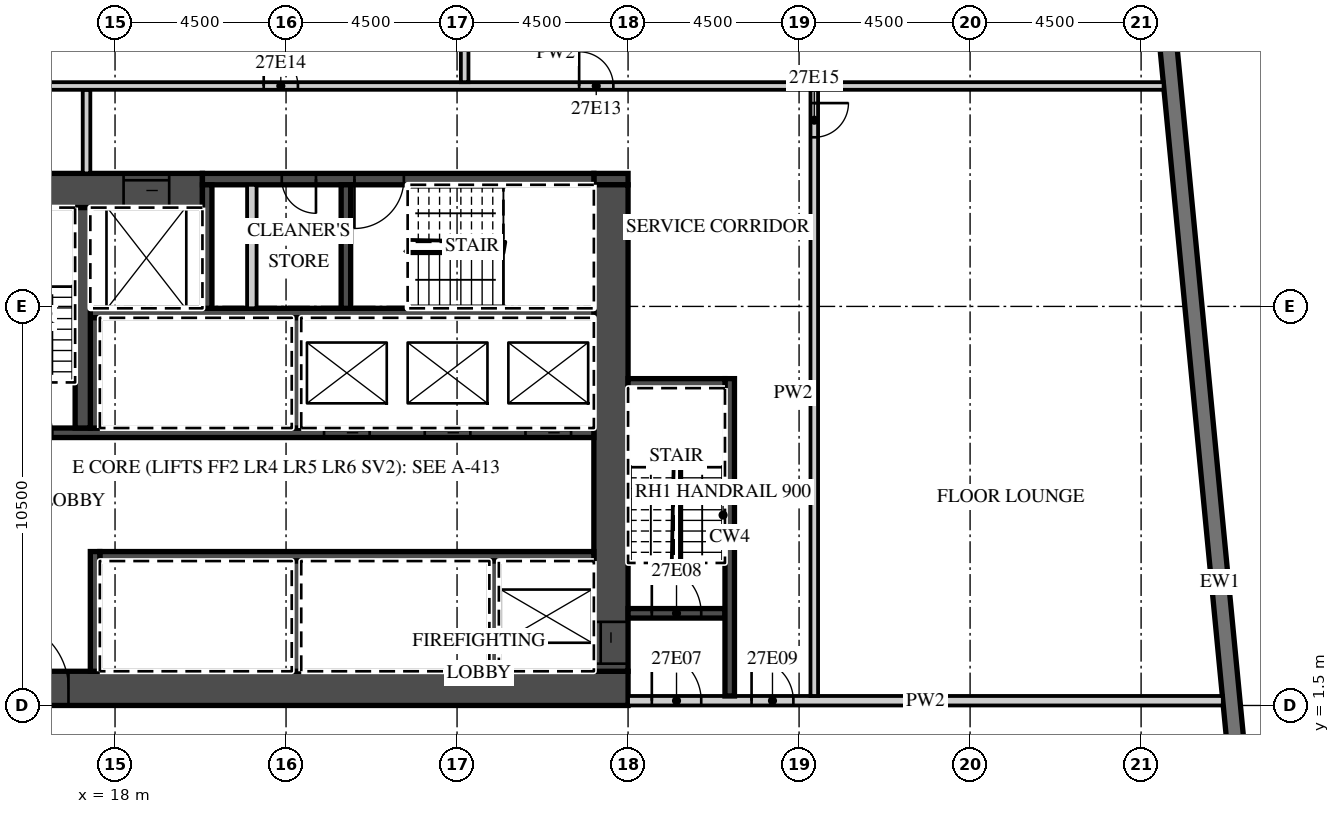
"""IFC4 building model, lengths in metres.
Left out: names, types, materials, properties, quantities, classifications, styles, units other than length and angle.
Written with IfcOpenShell. Run it as: python <this file> out.ifc"""

import sys

from ifc_helpers import new_model, si_unit, direction, frame, frame_2d, origin, place, context, subcontext, project, spatial, rectangle, extrude, element, fill, save


model = new_model("IFC4")
c1 = context("Model", 3, precision=1e-05, world=origin(), true_north=direction((0.0, 1.0)))
c2 = subcontext(c1, "Body", "Model", "MODEL_VIEW")
j1 = project(units=[si_unit("LENGTHUNIT", "METRE"), si_unit("PLANEANGLEUNIT", "RADIAN")], contexts=[c1])
p1 = place(None, origin())
s1 = spatial("IfcSite", under=j1, at=p1, CompositionType="ELEMENT")
p2 = place(p1, origin())
s2 = spatial("IfcBuilding", under=s1, at=p2, CompositionType="ELEMENT")
p3 = place(p2, frame((0.0, 0.0, 124.0)))
s3 = spatial("IfcBuildingStorey", under=s2, at=p3, CompositionType="ELEMENT", Elevation=124.0)
p4 = place(p3, frame((48.753, -12.672, 0.0), z_axis=(0.0, 0.0, 1.0), x_axis=(-0.095842661909, 0.995396495954, 0.0)))
e1 = element("IfcWall", 1, at=p4, inside=s3, PredefinedType="SOLIDWALL", context=c2, shape_type="SweptSolid", body=[
    extrude(rectangle(XDim=35.0, YDim=0.45, at=frame_2d((17.5, 0.0))), origin(), (0.0, 0.0, 1.0), 3.02),
])
p5 = place(p4, frame((3.072, 0.0, 0.45)))
e2 = element("IfcOpeningElement", 2, at=p5, cuts=e1, PredefinedType="OPENING", context=c2, shape_type="SweptSolid", body=[
    extrude(rectangle(XDim=3.3, YDim=2.25, at=frame_2d((1.65, 1.125))), frame((0.0, 0.235, 0.0), z_axis=(0.0, -1.0, 0.0), x_axis=(1.0, 0.0, 0.0)), (0.0, 0.0, 1.0), 0.47),
])
p6 = place(p4, frame((7.593, 0.0, 0.45)))
e3 = element("IfcOpeningElement", 3, at=p6, cuts=e1, PredefinedType="OPENING", context=c2, shape_type="SweptSolid", body=[
    extrude(rectangle(XDim=3.3, YDim=2.25, at=frame_2d((1.65, 1.125))), frame((0.0, 0.235, 0.0), z_axis=(0.0, -1.0, 0.0), x_axis=(1.0, 0.0, 0.0)), (0.0, 0.0, 1.0), 0.47),
])
p7 = place(p3, frame((13.5, 1.95, 0.0), z_axis=(0.0, 0.0, 1.0), x_axis=(1.0, 0.0, 0.0)))
e4 = element("IfcWall", 4, at=p7, inside=s3, PredefinedType="SHEAR", context=c2, shape_type="SweptSolid", body=[
    extrude(rectangle(XDim=18.0, YDim=0.9, at=frame_2d((9.0, 0.0))), origin(), (0.0, 0.0, 1.0), 3.02),
])
p8 = place(p7, frame((1.475, 0.0, 0.0)))
e5 = element("IfcOpeningElement", 5, at=p8, cuts=e4, PredefinedType="OPENING", context=c2, shape_type="SweptSolid", body=[
    extrude(rectangle(XDim=1.8, YDim=2.1, at=frame_2d((0.9, 1.05))), frame((0.0, 0.46, 0.0), z_axis=(0.0, -1.0, 0.0), x_axis=(1.0, 0.0, 0.0)), (0.0, 0.0, 1.0), 0.92),
])
p9 = place(p3, frame((13.5, 15.05, 0.0), z_axis=(0.0, 0.0, 1.0), x_axis=(1.0, 0.0, 0.0)))
e6 = element("IfcWall", 6, at=p9, inside=s3, PredefinedType="SHEAR", context=c2, shape_type="SweptSolid", body=[
    extrude(rectangle(XDim=6.8, YDim=0.9, at=frame_2d((3.4, 0.0))), origin(), (0.0, 0.0, 1.0), 3.02),
])
p10 = place(p9, frame((4.725, 0.0, 0.0)))
e7 = element("IfcOpeningElement", 7, at=p10, cuts=e6, PredefinedType="OPENING", context=c2, shape_type="SweptSolid", body=[
    extrude(rectangle(XDim=1.2, YDim=2.1, at=frame_2d((0.6, 1.05))), frame((0.0, 0.46, 0.0), z_axis=(0.0, -1.0, 0.0), x_axis=(1.0, 0.0, 0.0)), (0.0, 0.0, 1.0), 0.92),
])
p11 = place(p3, frame((30.6, 15.35, 0.0), z_axis=(0.0, 0.0, 1.0), x_axis=(1.0, 0.0, 0.0)))
e8 = element("IfcWall", 8, at=p11, inside=s3, PredefinedType="SHEAR", context=c2, shape_type="SweptSolid", body=[
    extrude(rectangle(XDim=0.9, YDim=0.3, at=frame_2d((0.45, 0.0))), origin(), (0.0, 0.0, 1.0), 3.02),
])
p12 = place(p3, frame((20.3, 15.35, 0.0), z_axis=(0.0, 0.0, 1.0), x_axis=(1.0, 0.0, 0.0)))
e9 = element("IfcWall", 9, at=p12, inside=s3, PredefinedType="SHEAR", context=c2, shape_type="SweptSolid", body=[
    extrude(rectangle(XDim=10.3, YDim=0.3, at=frame_2d((5.15, 0.0))), origin(), (0.0, 0.0, 1.0), 3.02),
])
p13 = place(p12, frame((4.0, 0.0, 0.0)))
e10 = element("IfcOpeningElement", 10, at=p13, cuts=e9, PredefinedType="OPENING", context=c2, shape_type="SweptSolid", body=[
    extrude(rectangle(XDim=1.3, YDim=2.1, at=frame_2d((0.65, 1.05))), frame((0.0, 0.16, 0.0), z_axis=(0.0, -1.0, 0.0), x_axis=(1.0, 0.0, 0.0)), (0.0, 0.0, 1.0), 0.32),
])
p14 = place(p12, frame((2.087, 0.0, 0.0)))
e11 = element("IfcOpeningElement", 11, at=p14, cuts=e9, PredefinedType="OPENING", context=c2, shape_type="SweptSolid", body=[
    extrude(rectangle(XDim=0.9, YDim=2.1, at=frame_2d((0.45, 1.05))), frame((0.0, 0.16, 0.0), z_axis=(0.0, -1.0, 0.0), x_axis=(1.0, 0.0, 0.0)), (0.0, 0.0, 1.0), 0.32),
])
p15 = place(p3, frame((31.05, 2.4, 0.0), z_axis=(0.0, 0.0, 1.0), x_axis=(0.0, 1.0, 0.0)))
e12 = element("IfcWall", 12, at=p15, inside=s3, PredefinedType="SHEAR", context=c2, shape_type="SweptSolid", body=[
    extrude(rectangle(XDim=12.8, YDim=0.9, at=frame_2d((6.4, 0.0))), origin(), (0.0, 0.0, 1.0), 3.02),
])
p16 = place(p15, frame((0.2, 0.0, 0.0)))
e13 = element("IfcOpeningElement", 13, at=p16, cuts=e12, PredefinedType="OPENING", context=c2, shape_type="SweptSolid", body=[
    extrude(rectangle(XDim=1.1, YDim=2.1, at=frame_2d((0.55, 1.05))), frame((0.0, 0.46, 0.0), z_axis=(0.0, -1.0, 0.0), x_axis=(1.0, 0.0, 0.0)), (0.0, 0.0, 1.0), 0.92),
])
p17 = place(p3, frame((17.6, 5.425, 0.0), z_axis=(0.0, 0.0, 1.0), x_axis=(1.0, 0.0, 0.0)))
e14 = element("IfcWall", 14, at=p17, inside=s3, PredefinedType="SHEAR", context=c2, shape_type="SweptSolid", body=[
    extrude(rectangle(XDim=13.0, YDim=0.25, at=frame_2d((6.5, 0.0))), origin(), (0.0, 0.0, 1.0), 3.02),
])
p18 = place(p3, frame((17.475, 2.4, 0.0), z_axis=(0.0, 0.0, 1.0), x_axis=(0.0, 1.0, 0.0)))
e15 = element("IfcWall", 15, at=p18, inside=s3, PredefinedType="SHEAR", context=c2, shape_type="SweptSolid", body=[
    extrude(rectangle(XDim=3.15, YDim=0.25, at=frame_2d((1.575, 0.0))), origin(), (0.0, 0.0, 1.0), 3.02),
])
for number, where, z_axis, x_axis in (
    (16, (27.975, 2.4, 0.0), (0.0, 0.0, 1.0), (0.0, 1.0, 0.0)),
    (17, (22.775, 2.4, 0.0), (0.0, 0.0, 1.0), (0.0, 1.0, 0.0)),
):
    element("IfcWall", number, at=place(p3, frame(where, z_axis=z_axis, x_axis=x_axis)), inside=s3, PredefinedType="SHEAR", context=c2, shape_type="SweptSolid", body=[
        extrude(rectangle(XDim=2.9, YDim=0.25, at=frame_2d((1.45, 0.0))), origin(), (0.0, 0.0, 1.0), 3.02),
    ])
p19 = place(p3, frame((14.4, 8.675, 0.0), z_axis=(0.0, 0.0, 1.0), x_axis=(1.0, 0.0, 0.0)))
e18 = element("IfcWall", 18, at=p19, inside=s3, PredefinedType="SHEAR", context=c2, shape_type="SweptSolid", body=[
    extrude(rectangle(XDim=16.2, YDim=0.25, at=frame_2d((8.1, 0.0))), origin(), (0.0, 0.0, 1.0), 3.02),
])
p20 = place(p19, frame((14.4, 0.0, 0.0)))
e19 = element("IfcOpeningElement", 19, at=p20, cuts=e18, PredefinedType="OPENING", context=c2, shape_type="SweptSolid", body=[
    extrude(rectangle(XDim=1.2, YDim=2.1, at=frame_2d((0.6, 1.05))), frame((0.0, 0.135, 0.0), z_axis=(0.0, -1.0, 0.0), x_axis=(1.0, 0.0, 0.0)), (0.0, 0.0, 1.0), 0.27),
])
p21 = place(p19, frame((11.75, 0.0, 0.0)))
e20 = element("IfcOpeningElement", 20, at=p21, cuts=e18, PredefinedType="OPENING", context=c2, shape_type="SweptSolid", body=[
    extrude(rectangle(XDim=1.2, YDim=2.1, at=frame_2d((0.6, 1.05))), frame((0.0, 0.135, 0.0), z_axis=(0.0, -1.0, 0.0), x_axis=(1.0, 0.0, 0.0)), (0.0, 0.0, 1.0), 0.27),
])
p22 = place(p19, frame((9.1, 0.0, 0.0)))
e21 = element("IfcOpeningElement", 21, at=p22, cuts=e18, PredefinedType="OPENING", context=c2, shape_type="SweptSolid", body=[
    extrude(rectangle(XDim=1.2, YDim=2.1, at=frame_2d((0.6, 1.05))), frame((0.0, 0.135, 0.0), z_axis=(0.0, -1.0, 0.0), x_axis=(1.0, 0.0, 0.0)), (0.0, 0.0, 1.0), 0.27),
])
p23 = place(p19, frame((0.65, 0.0, 0.0)))
e22 = element("IfcOpeningElement", 22, at=p23, cuts=e18, PredefinedType="OPENING", context=c2, shape_type="SweptSolid", body=[
    extrude(rectangle(XDim=1.3, YDim=2.1, at=frame_2d((0.65, 1.05))), frame((0.0, 0.135, 0.0), z_axis=(0.0, -1.0, 0.0), x_axis=(1.0, 0.0, 0.0)), (0.0, 0.0, 1.0), 0.27),
])
p24 = place(p3, frame((17.35, 11.825, 0.0), z_axis=(0.0, 0.0, 1.0), x_axis=(1.0, 0.0, 0.0)))
e23 = element("IfcWall", 23, at=p24, inside=s3, PredefinedType="SHEAR", context=c2, shape_type="SweptSolid", body=[
    extrude(rectangle(XDim=13.25, YDim=0.25, at=frame_2d((6.625, 0.0))), origin(), (0.0, 0.0, 1.0), 3.02),
])
for number, where, z_axis, x_axis in (
    (24, (17.475, 8.8, 0.0), (0.0, 0.0, 1.0), (0.0, 1.0, 0.0)),
    (25, (22.775, 8.8, 0.0), (0.0, 0.0, 1.0), (0.0, 1.0, 0.0)),
):
    element("IfcWall", number, at=place(p3, frame(where, z_axis=z_axis, x_axis=x_axis)), inside=s3, PredefinedType="SHEAR", context=c2, shape_type="SweptSolid", body=[
        extrude(rectangle(XDim=2.9, YDim=0.25, at=frame_2d((1.45, 0.0))), origin(), (0.0, 0.0, 1.0), 3.02),
    ])
p25 = place(p3, frame((17.15, 8.8, 0.0), z_axis=(0.0, 0.0, 1.0), x_axis=(0.0, 1.0, 0.0)))
e26 = element("IfcWall", 26, at=p25, inside=s3, PredefinedType="SHEAR", context=c2, shape_type="SweptSolid", body=[
    extrude(rectangle(XDim=5.8, YDim=0.4, at=frame_2d((2.9, 0.0))), origin(), (0.0, 0.0, 1.0), 3.02),
])
for number, where, z_axis, x_axis in (
    (27, (20.425, 11.95, 0.0), (0.0, 0.0, 1.0), (0.0, 1.0, 0.0)),
    (28, (24.075, 11.95, 0.0), (0.0, 0.0, 1.0), (0.0, 1.0, 0.0)),
):
    element("IfcWall", number, at=place(p3, frame(where, z_axis=z_axis, x_axis=x_axis)), inside=s3, PredefinedType="SHEAR", context=c2, shape_type="SweptSolid", body=[
        extrude(rectangle(XDim=3.25, YDim=0.25, at=frame_2d((1.625, 0.0))), origin(), (0.0, 0.0, 1.0), 3.02),
    ])
p26 = place(p3, frame((21.6, 11.95, 0.0), z_axis=(0.0, 0.0, 1.0), x_axis=(0.0, 1.0, 0.0)))
e29 = element("IfcWall", 29, at=p26, inside=s3, PredefinedType="PARTITIONING", context=c2, shape_type="SweptSolid", body=[
    extrude(rectangle(XDim=3.25, YDim=0.25, at=frame_2d((1.625, 0.0))), origin(), (0.0, 0.0, 1.0), 3.02),
])
p27 = place(p3, frame((31.5, 1.625, 0.0), z_axis=(0.0, 0.0, 1.0), x_axis=(1.0, 0.0, 0.0)))
e30 = element("IfcWall", 30, at=p27, inside=s3, PredefinedType="PARTITIONING", context=c2, shape_type="SweptSolid", body=[
    extrude(rectangle(XDim=15.65, YDim=0.25, at=frame_2d((7.825, 0.0))), origin(), (0.0, 0.0, 1.0), 3.02),
])
p28 = place(p27, frame((0.625, 0.0, 0.0)))
e31 = element("IfcOpeningElement", 31, at=p28, cuts=e30, PredefinedType="OPENING", context=c2, shape_type="SweptSolid", body=[
    extrude(rectangle(XDim=1.3, YDim=2.1, at=frame_2d((0.65, 1.05))), frame((0.0, 0.135, 0.0), z_axis=(0.0, -1.0, 0.0), x_axis=(1.0, 0.0, 0.0)), (0.0, 0.0, 1.0), 0.27),
])
p29 = place(p27, frame((3.25, 0.0, 0.0)))
e32 = element("IfcOpeningElement", 32, at=p29, cuts=e30, PredefinedType="OPENING", context=c2, shape_type="SweptSolid", body=[
    extrude(rectangle(XDim=1.1, YDim=2.1, at=frame_2d((0.55, 1.05))), frame((0.0, 0.135, 0.0), z_axis=(0.0, -1.0, 0.0), x_axis=(1.0, 0.0, 0.0)), (0.0, 0.0, 1.0), 0.27),
])
p30 = place(p3, frame((31.5, 3.925, 0.0), z_axis=(0.0, 0.0, 1.0), x_axis=(1.0, 0.0, 0.0)))
e33 = element("IfcWall", 33, at=p30, inside=s3, PredefinedType="SHEAR", context=c2, shape_type="SweptSolid", body=[
    extrude(rectangle(XDim=2.55, YDim=0.25, at=frame_2d((1.275, 0.0))), origin(), (0.0, 0.0, 1.0), 3.02),
])
p31 = place(p30, frame((0.625, 0.0, 0.0)))
e34 = element("IfcOpeningElement", 34, at=p31, cuts=e33, PredefinedType="OPENING", context=c2, shape_type="SweptSolid", body=[
    extrude(rectangle(XDim=1.3, YDim=2.1, at=frame_2d((0.65, 1.05))), frame((0.0, 0.135, 0.0), z_axis=(0.0, -1.0, 0.0), x_axis=(1.0, 0.0, 0.0)), (0.0, 0.0, 1.0), 0.27),
])
p32 = place(p3, frame((34.175, 1.75, 0.0), z_axis=(0.0, 0.0, 1.0), x_axis=(0.0, 1.0, 0.0)))
e35 = element("IfcWall", 35, at=p32, inside=s3, PredefinedType="SHEAR", context=c2, shape_type="SweptSolid", body=[
    extrude(rectangle(XDim=8.35, YDim=0.25, at=frame_2d((4.175, 0.0))), origin(), (0.0, 0.0, 1.0), 3.02),
])
p33 = place(p3, frame((31.5, 9.975, 0.0), z_axis=(0.0, 0.0, 1.0), x_axis=(1.0, 0.0, 0.0)))
e36 = element("IfcWall", 36, at=p33, inside=s3, PredefinedType="SHEAR", context=c2, shape_type="SweptSolid", body=[
    extrude(rectangle(XDim=2.55, YDim=0.25, at=frame_2d((1.275, 0.0))), origin(), (0.0, 0.0, 1.0), 3.02),
])
p34 = place(p3, frame((17.25, 15.5, 0.0), z_axis=(0.0, 0.0, 1.0), x_axis=(0.0, 1.0, 0.0)))
e37 = element("IfcWall", 37, at=p34, inside=s3, PredefinedType="PARTITIONING", context=c2, shape_type="SweptSolid", body=[
    extrude(rectangle(XDim=2.2, YDim=0.2, at=frame_2d((1.1, 0.0))), origin(), (0.0, 0.0, 1.0), 3.02),
])
p35 = place(p3, frame((36.4, 1.75, 0.0), z_axis=(0.0, 0.0, 1.0), x_axis=(0.0, 1.0, 0.0)))
e38 = element("IfcWall", 38, at=p35, inside=s3, PredefinedType="PARTITIONING", context=c2, shape_type="SweptSolid", body=[
    extrude(rectangle(XDim=15.95, YDim=0.2, at=frame_2d((7.975, 0.0))), origin(), (0.0, 0.0, 1.0), 3.02),
])
p36 = place(p35, frame((14.7, 0.0, 0.0)))
e39 = element("IfcOpeningElement", 39, at=p36, cuts=e38, PredefinedType="OPENING", context=c2, shape_type="SweptSolid", body=[
    extrude(rectangle(XDim=0.9, YDim=2.1, at=frame_2d((0.45, 1.05))), frame((0.0, 0.11, 0.0), z_axis=(0.0, -1.0, 0.0), x_axis=(1.0, 0.0, 0.0)), (0.0, 0.0, 1.0), 0.22),
])
p37 = place(p3, frame((13.6, 17.8, 0.0), z_axis=(0.0, 0.0, 1.0), x_axis=(1.0, 0.0, 0.0)))
e40 = element("IfcWall", 40, at=p37, inside=s3, PredefinedType="PARTITIONING", context=c2, shape_type="SweptSolid", body=[
    extrude(rectangle(XDim=31.993, YDim=0.2, at=frame_2d((15.997, 0.0))), origin(), (0.0, 0.0, 1.0), 3.02),
])
p38 = place(p37, frame((16.613, 0.0, 0.0)))
e41 = element("IfcOpeningElement", 41, at=p38, cuts=e40, PredefinedType="OPENING", context=c2, shape_type="SweptSolid", body=[
    extrude(rectangle(XDim=0.9, YDim=2.1, at=frame_2d((0.45, 1.05))), frame((0.0, 0.11, 0.0), z_axis=(0.0, -1.0, 0.0), x_axis=(1.0, 0.0, 0.0)), (0.0, 0.0, 1.0), 0.22),
])
p39 = place(p37, frame((8.312, 0.0, 0.0)))
e42 = element("IfcOpeningElement", 42, at=p39, cuts=e40, PredefinedType="OPENING", context=c2, shape_type="SweptSolid", body=[
    extrude(rectangle(XDim=0.9, YDim=2.1, at=frame_2d((0.45, 1.05))), frame((0.0, 0.11, 0.0), z_axis=(0.0, -1.0, 0.0), x_axis=(1.0, 0.0, 0.0)), (0.0, 0.0, 1.0), 0.22),
])
p40 = place(p3, frame((27.2, 17.9, 0.0), z_axis=(0.0, 0.0, 1.0), x_axis=(0.0, 1.0, 0.0)))
e43 = element("IfcWall", 43, at=p40, inside=s3, PredefinedType="PARTITIONING", context=c2, shape_type="SweptSolid", body=[
    extrude(rectangle(XDim=6.082, YDim=0.2, at=frame_2d((3.041, 0.0))), origin(), (0.0, 0.0, 1.0), 3.02),
])
p41 = place(p20, origin())
e44 = element("IfcDoor", 44, at=p41, inside=s3, OperationType="SLIDING_TO_LEFT", PredefinedType="DOOR", context=c2, shape_type="SweptSolid", body=[
    extrude(rectangle(XDim=1.2, YDim=2.1, at=frame_2d((0.6, 1.05))), frame((0.0, 0.025, 0.0), z_axis=(0.0, -1.0, 0.0), x_axis=(1.0, 0.0, 0.0)), (0.0, 0.0, 1.0), 0.05),
])
fill(e19, e44)
p42 = place(p21, origin())
e45 = element("IfcDoor", 45, at=p42, inside=s3, OperationType="SLIDING_TO_RIGHT", PredefinedType="DOOR", context=c2, shape_type="SweptSolid", body=[
    extrude(rectangle(XDim=1.2, YDim=2.1, at=frame_2d((0.6, 1.05))), frame((0.0, 0.025, 0.0), z_axis=(0.0, -1.0, 0.0), x_axis=(1.0, 0.0, 0.0)), (0.0, 0.0, 1.0), 0.05),
])
fill(e20, e45)
p43 = place(p22, origin())
e46 = element("IfcDoor", 46, at=p43, inside=s3, OperationType="SLIDING_TO_RIGHT", PredefinedType="DOOR", context=c2, shape_type="SweptSolid", body=[
    extrude(rectangle(XDim=1.2, YDim=2.1, at=frame_2d((0.6, 1.05))), frame((0.0, 0.025, 0.0), z_axis=(0.0, -1.0, 0.0), x_axis=(1.0, 0.0, 0.0)), (0.0, 0.0, 1.0), 0.05),
])
fill(e21, e46)
p44 = place(p10, origin())
e47 = element("IfcDoor", 47, at=p44, inside=s3, OperationType="SLIDING_TO_LEFT", PredefinedType="DOOR", context=c2, shape_type="SweptSolid", body=[
    extrude(rectangle(XDim=1.2, YDim=2.1, at=frame_2d((0.6, 1.05))), frame((0.0, 0.025, 0.0), z_axis=(0.0, -1.0, 0.0), x_axis=(1.0, 0.0, 0.0)), (0.0, 0.0, 1.0), 0.05),
])
fill(e7, e47)
p45 = place(p16, origin())
e48 = element("IfcDoor", 48, at=p45, inside=s3, OperationType="SLIDING_TO_LEFT", PredefinedType="DOOR", context=c2, shape_type="SweptSolid", body=[
    extrude(rectangle(XDim=1.1, YDim=2.1, at=frame_2d((0.55, 1.05))), frame((0.0, 0.025, 0.0), z_axis=(0.0, -1.0, 0.0), x_axis=(1.0, 0.0, 0.0)), (0.0, 0.0, 1.0), 0.05),
])
fill(e13, e48)
p46 = place(p8, origin())
e49 = element("IfcDoor", 49, at=p46, inside=s3, OperationType="DOUBLE_DOOR_DOUBLE_SWING", PredefinedType="DOOR", context=c2, shape_type="SweptSolid", body=[
    extrude(rectangle(XDim=1.8, YDim=2.1, at=frame_2d((0.9, 1.05))), frame((0.0, 0.025, 0.0), z_axis=(0.0, -1.0, 0.0), x_axis=(1.0, 0.0, 0.0)), (0.0, 0.0, 1.0), 0.05),
])
fill(e5, e49)
p47 = place(p28, origin())
e50 = element("IfcDoor", 50, at=p47, inside=s3, OperationType="SINGLE_SWING_LEFT", PredefinedType="DOOR", context=c2, shape_type="SweptSolid", body=[
    extrude(rectangle(XDim=1.3, YDim=2.1, at=frame_2d((0.65, 1.05))), frame((0.0, 0.025, 0.0), z_axis=(0.0, -1.0, 0.0), x_axis=(1.0, 0.0, 0.0)), (0.0, 0.0, 1.0), 0.05),
])
fill(e31, e50)
p48 = place(p31, origin())
e51 = element("IfcDoor", 51, at=p48, inside=s3, OperationType="SINGLE_SWING_LEFT", PredefinedType="DOOR", context=c2, shape_type="SweptSolid", body=[
    extrude(rectangle(XDim=1.3, YDim=2.1, at=frame_2d((0.65, 1.05))), frame((0.0, 0.025, 0.0), z_axis=(0.0, -1.0, 0.0), x_axis=(1.0, 0.0, 0.0)), (0.0, 0.0, 1.0), 0.05),
])
fill(e34, e51)
p49 = place(p29, origin())
e52 = element("IfcDoor", 52, at=p49, inside=s3, OperationType="SINGLE_SWING_LEFT", PredefinedType="DOOR", context=c2, shape_type="SweptSolid", body=[
    extrude(rectangle(XDim=1.1, YDim=2.1, at=frame_2d((0.55, 1.05))), frame((0.0, 0.025, 0.0), z_axis=(0.0, -1.0, 0.0), x_axis=(1.0, 0.0, 0.0)), (0.0, 0.0, 1.0), 0.05),
])
fill(e32, e52)
p50 = place(p13, origin())
e53 = element("IfcDoor", 53, at=p50, inside=s3, OperationType="SINGLE_SWING_LEFT", PredefinedType="DOOR", context=c2, shape_type="SweptSolid", body=[
    extrude(rectangle(XDim=1.3, YDim=2.1, at=frame_2d((0.65, 1.05))), frame((0.0, 0.025, 0.0), z_axis=(0.0, -1.0, 0.0), x_axis=(1.0, 0.0, 0.0)), (0.0, 0.0, 1.0), 0.05),
])
fill(e10, e53)
p51 = place(p14, origin())
e54 = element("IfcDoor", 54, at=p51, inside=s3, OperationType="SINGLE_SWING_RIGHT", PredefinedType="DOOR", context=c2, shape_type="SweptSolid", body=[
    extrude(rectangle(XDim=0.9, YDim=2.1, at=frame_2d((0.45, 1.05))), frame((0.0, 0.025, 0.0), z_axis=(0.0, -1.0, 0.0), x_axis=(1.0, 0.0, 0.0)), (0.0, 0.0, 1.0), 0.05),
])
fill(e11, e54)
p52 = place(p38, origin())
e55 = element("IfcDoor", 55, at=p52, inside=s3, OperationType="SINGLE_SWING_LEFT", PredefinedType="DOOR", context=c2, shape_type="SweptSolid", body=[
    extrude(rectangle(XDim=0.9, YDim=2.1, at=frame_2d((0.45, 1.05))), frame((0.0, 0.025, 0.0), z_axis=(0.0, -1.0, 0.0), x_axis=(1.0, 0.0, 0.0)), (0.0, 0.0, 1.0), 0.05),
])
fill(e41, e55)
p53 = place(p39, origin())
e56 = element("IfcDoor", 56, at=p53, inside=s3, OperationType="SINGLE_SWING_LEFT", PredefinedType="DOOR", context=c2, shape_type="SweptSolid", body=[
    extrude(rectangle(XDim=0.9, YDim=2.1, at=frame_2d((0.45, 1.05))), frame((0.0, 0.025, 0.0), z_axis=(0.0, -1.0, 0.0), x_axis=(1.0, 0.0, 0.0)), (0.0, 0.0, 1.0), 0.05),
])
fill(e42, e56)
p54 = place(p36, origin())
e57 = element("IfcDoor", 57, at=p54, inside=s3, OperationType="SINGLE_SWING_RIGHT", PredefinedType="DOOR", context=c2, shape_type="SweptSolid", body=[
    extrude(rectangle(XDim=0.9, YDim=2.1, at=frame_2d((0.45, 1.05))), frame((0.0, 0.025, 0.0), z_axis=(0.0, -1.0, 0.0), x_axis=(1.0, 0.0, 0.0)), (0.0, 0.0, 1.0), 0.05),
])
fill(e39, e57)
save(model, sys.argv[1])
